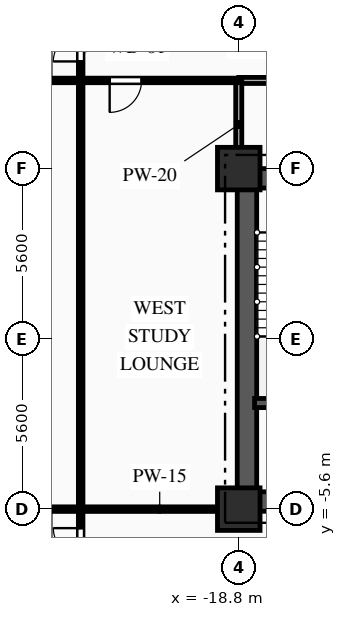
"""IFC4 building model, lengths in metres.
Left out: names, types, materials, properties, quantities, classifications, styles, units other than length and angle.
Written with IfcOpenShell. Run it as: python <this file> out.ifc"""

import sys

from ifc_helpers import new_model, si_unit, direction, frame, frame_2d, origin, origin_2d, place, context, subcontext, project, spatial, rectangle, extrude, element, fill, save


model = new_model("IFC4")
c1 = context("Model", 3, precision=1e-05, world=origin(), true_north=direction((0.0, 1.0)))
c2 = subcontext(c1, "Body", "Model", "MODEL_VIEW")
j1 = project(units=[si_unit("LENGTHUNIT", "METRE"), si_unit("PLANEANGLEUNIT", "RADIAN")], contexts=[c1])
p1 = place(None, origin())
s1 = spatial("IfcSite", under=j1, at=p1, CompositionType="ELEMENT")
p2 = place(p1, origin())
s2 = spatial("IfcBuilding", under=s1, at=p2, CompositionType="ELEMENT")
p3 = place(p2, frame((0.0, 0.0, 22.5)))
s3 = spatial("IfcBuildingStorey", under=s2, at=p3, CompositionType="ELEMENT", Elevation=22.5)
for number, where, z_axis, x_axis in (
    (1, (-18.8, -5.6, 0.0), (0.0, 0.0, 1.0), (1.0, 0.0, 0.0)),
    (2, (-18.8, 5.6, 0.0), (0.0, 0.0, 1.0), (1.0, 0.0, 0.0)),
):
    element("IfcColumn", number, at=place(p3, frame(where, z_axis=z_axis, x_axis=x_axis)), inside=s3, PredefinedType="COLUMN", context=c2, shape_type="SweptSolid", body=[
        extrude(rectangle(XDim=1.4, YDim=1.4, at=origin_2d()), origin(), (0.0, 0.0, 1.0), 4.5),
    ])
p4 = place(p3, frame((-18.8, 5.28, 0.0), z_axis=(0.0, 0.0, 1.0), x_axis=(1.0, 0.0, 0.0)))
e3 = element("IfcWall", 3, at=p4, inside=s3, PredefinedType="SHEAR", context=c2, shape_type="SweptSolid", body=[
    extrude(rectangle(XDim=9.6, YDim=0.64, at=frame_2d((4.8, 0.0))), origin(), (0.0, 0.0, 1.0), 4.16),
])
p5 = place(p4, frame((1.55, 0.0, 0.0)))
e4 = element("IfcOpeningElement", 4, at=p5, cuts=e3, PredefinedType="OPENING", context=c2, shape_type="SweptSolid", body=[
    extrude(rectangle(XDim=1.1, YDim=2.15, at=frame_2d((0.55, 1.075))), frame((0.0, 0.33, 0.0), z_axis=(0.0, -1.0, 0.0), x_axis=(1.0, 0.0, 0.0)), (0.0, 0.0, 1.0), 0.66),
])
p6 = place(p4, frame((4.775, 0.0, 0.0)))
e5 = element("IfcOpeningElement", 5, at=p6, cuts=e3, PredefinedType="OPENING", context=c2, shape_type="SweptSolid", body=[
    extrude(rectangle(XDim=1.05, YDim=2.1, at=frame_2d((0.525, 1.05))), frame((0.0, 0.33, 0.0), z_axis=(0.0, -1.0, 0.0), x_axis=(1.0, 0.0, 0.0)), (0.0, 0.0, 1.0), 0.66),
])
p7 = place(p3, frame((-18.8, -5.35, 0.0), z_axis=(0.0, 0.0, 1.0), x_axis=(1.0, 0.0, 0.0)))
e6 = element("IfcWall", 6, at=p7, inside=s3, PredefinedType="SHEAR", context=c2, shape_type="SweptSolid", body=[
    extrude(rectangle(XDim=9.6, YDim=0.64, at=frame_2d((4.8, 0.0))), origin(), (0.0, 0.0, 1.0), 4.16),
])
p8 = place(p7, frame((1.05, 0.0, 0.0)))
e7 = element("IfcOpeningElement", 7, at=p8, cuts=e6, PredefinedType="OPENING", context=c2, shape_type="SweptSolid", body=[
    extrude(rectangle(XDim=0.9, YDim=2.1, at=frame_2d((0.45, 1.05))), frame((0.0, 0.33, 0.0), z_axis=(0.0, -1.0, 0.0), x_axis=(1.0, 0.0, 0.0)), (0.0, 0.0, 1.0), 0.66),
])
p9 = place(p3, frame((-18.53, -5.05, 0.0), z_axis=(0.0, 0.0, 1.0), x_axis=(0.0, 1.0, 0.0)))
e8 = element("IfcWall", 8, at=p9, inside=s3, PredefinedType="SHEAR", context=c2, shape_type="SweptSolid", body=[
    extrude(rectangle(XDim=10.1, YDim=0.64, at=frame_2d((5.05, 0.0))), origin(), (0.0, 0.0, 1.0), 4.16),
])
p10 = place(p3, frame((-18.28, -2.11, 0.0), z_axis=(0.0, 0.0, 1.0), x_axis=(1.0, 0.0, 0.0)))
e9 = element("IfcWall", 9, at=p10, inside=s3, PredefinedType="SHEAR", context=c2, shape_type="SweptSolid", body=[
    extrude(rectangle(XDim=3.18, YDim=0.3, at=frame_2d((1.59, 0.0))), origin(), (0.0, 0.0, 1.0), 4.16),
])
p11 = place(p3, frame((-12.0, 8.5, 0.0), z_axis=(0.0, 0.0, 1.0), x_axis=(-1.0, 0.0, 0.0)))
e10 = element("IfcWall", 10, at=p11, inside=s3, PredefinedType="PARTITIONING", context=c2, shape_type="SweptSolid", body=[
    extrude(rectangle(XDim=6.8, YDim=0.2, at=frame_2d((3.4, 0.0))), origin(), (0.0, 0.0, 1.0), 4.16),
])
p12 = place(p11, frame((1.715, 0.0, 0.0)))
e11 = element("IfcOpeningElement", 11, at=p12, cuts=e10, PredefinedType="OPENING", context=c2, shape_type="SweptSolid", body=[
    extrude(rectangle(XDim=1.1, YDim=2.15, at=frame_2d((0.55, 1.075))), frame((0.0, 0.11, 0.0), z_axis=(0.0, -1.0, 0.0), x_axis=(1.0, 0.0, 0.0)), (0.0, 0.0, 1.0), 0.22),
])
p13 = place(p3, frame((-18.8, 8.5, 0.0), z_axis=(0.0, 0.0, 1.0), x_axis=(0.0, -1.0, 0.0)))
e12 = element("IfcWall", 12, at=p13, inside=s3, PredefinedType="PARTITIONING", context=c2, shape_type="SweptSolid", body=[
    extrude(rectangle(XDim=2.9, YDim=0.2, at=frame_2d((1.45, 0.0))), origin(), (0.0, 0.0, 1.0), 3.645),
])
p14 = place(p3, frame((-24.0, 8.5, 0.0), z_axis=(0.0, 0.0, 1.0), x_axis=(0.0, 1.0, 0.0)))
e13 = element("IfcWall", 13, at=p14, inside=s3, PredefinedType="PARTITIONING", context=c2, shape_type="SweptSolid", body=[
    extrude(rectangle(XDim=2.15, YDim=0.15, at=frame_2d((1.075, 0.0))), origin(), (0.0, 0.0, 1.0), 4.16),
])
p15 = place(p14, frame((0.625, 0.0, 0.0)))
e14 = element("IfcOpeningElement", 14, at=p15, cuts=e13, PredefinedType="OPENING", context=c2, shape_type="SweptSolid", body=[
    extrude(rectangle(XDim=0.9, YDim=2.1, at=frame_2d((0.45, 1.05))), frame((0.0, 0.085, 0.0), z_axis=(0.0, -1.0, 0.0), x_axis=(1.0, 0.0, 0.0)), (0.0, 0.0, 1.0), 0.17),
])
p16 = place(p3, frame((-18.8, 8.5, 0.0), z_axis=(0.0, 0.0, 1.0), x_axis=(-1.0, 0.0, 0.0)))
e15 = element("IfcWall", 15, at=p16, inside=s3, PredefinedType="PARTITIONING", context=c2, shape_type="SweptSolid", body=[
    extrude(rectangle(XDim=5.2, YDim=0.15, at=frame_2d((2.6, 0.0))), origin(), (0.0, 0.0, 1.0), 4.16),
])
p17 = place(p16, frame((3.196, 0.0, 0.0)))
e16 = element("IfcOpeningElement", 16, at=p17, cuts=e15, PredefinedType="OPENING", context=c2, shape_type="SweptSolid", body=[
    extrude(rectangle(XDim=1.05, YDim=2.15, at=frame_2d((0.525, 1.075))), frame((0.0, 0.085, 0.0), z_axis=(0.0, -1.0, 0.0), x_axis=(1.0, 0.0, 0.0)), (0.0, 0.0, 1.0), 0.17),
])
p18 = place(p3, frame((-24.0, -7.75, 0.0), z_axis=(0.0, 0.0, 1.0), x_axis=(0.0, 1.0, 0.0)))
e17 = element("IfcWall", 17, at=p18, inside=s3, PredefinedType="PARTITIONING", context=c2, shape_type="SweptSolid", body=[
    extrude(rectangle(XDim=2.15, YDim=0.15, at=frame_2d((1.075, 0.0))), origin(), (0.0, 0.0, 1.0), 4.16),
])
p19 = place(p18, frame((0.625, 0.0, 0.0)))
e18 = element("IfcOpeningElement", 18, at=p19, cuts=e17, PredefinedType="OPENING", context=c2, shape_type="SweptSolid", body=[
    extrude(rectangle(XDim=0.9, YDim=2.1, at=frame_2d((0.45, 1.05))), frame((0.0, 0.085, 0.0), z_axis=(0.0, -1.0, 0.0), x_axis=(1.0, 0.0, 0.0)), (0.0, 0.0, 1.0), 0.17),
])
p20 = place(p3, frame((-24.0, -5.6, 0.0), z_axis=(0.0, 0.0, 1.0), x_axis=(1.0, 0.0, 0.0)))
e19 = element("IfcWall", 19, at=p20, inside=s3, PredefinedType="PARTITIONING", context=c2, shape_type="SweptSolid", body=[
    extrude(rectangle(XDim=5.2, YDim=0.15, at=frame_2d((2.6, 0.0))), origin(), (0.0, 0.0, 1.0), 4.16),
])
p21 = place(p3, frame((-26.65, 8.5, 0.0), z_axis=(0.0, 0.0, 1.0), x_axis=(1.0, 0.0, 0.0)))
e20 = element("IfcWall", 20, at=p21, inside=s3, PredefinedType="PARTITIONING", context=c2, shape_type="SweptSolid", body=[
    extrude(rectangle(XDim=2.65, YDim=0.15, at=frame_2d((1.325, 0.0))), origin(), (0.0, 0.0, 1.0), 4.16),
])
p22 = place(p21, frame((0.635, 0.0, 0.0)))
e21 = element("IfcOpeningElement", 21, at=p22, cuts=e20, PredefinedType="OPENING", context=c2, shape_type="SweptSolid", body=[
    extrude(rectangle(XDim=1.05, YDim=2.15, at=frame_2d((0.525, 1.075))), frame((0.0, 0.085, 0.0), z_axis=(0.0, -1.0, 0.0), x_axis=(1.0, 0.0, 0.0)), (0.0, 0.0, 1.0), 0.17),
])
p23 = place(p3, frame((-24.0, -5.6, 0.0), z_axis=(0.0, 0.0, 1.0), x_axis=(-1.0, 0.0, 0.0)))
e22 = element("IfcWall", 22, at=p23, inside=s3, PredefinedType="PARTITIONING", context=c2, shape_type="SweptSolid", body=[
    extrude(rectangle(XDim=2.65, YDim=0.15, at=frame_2d((1.325, 0.0))), origin(), (0.0, 0.0, 1.0), 4.16),
])
p24 = place(p23, frame((0.965, 0.0, 0.0)))
e23 = element("IfcOpeningElement", 23, at=p24, cuts=e22, PredefinedType="OPENING", context=c2, shape_type="SweptSolid", body=[
    extrude(rectangle(XDim=1.05, YDim=2.15, at=frame_2d((0.525, 1.075))), frame((0.0, 0.085, 0.0), z_axis=(0.0, -1.0, 0.0), x_axis=(1.0, 0.0, 0.0)), (0.0, 0.0, 1.0), 0.17),
])
p25 = place(p3, frame((-24.0, 8.5, 0.0), z_axis=(0.0, 0.0, 1.0), x_axis=(0.0, -1.0, 0.0)))
e24 = element("IfcWall", 24, at=p25, inside=s3, PredefinedType="PARTITIONING", context=c2, shape_type="SweptSolid", body=[
    extrude(rectangle(XDim=14.1, YDim=0.15, at=frame_2d((7.05, 0.0))), origin(), (0.0, 0.0, 1.0), 4.16),
])
p26 = place(p15, origin())
e25 = element("IfcDoor", 25, at=p26, inside=s3, OperationType="SINGLE_SWING_LEFT", PredefinedType="DOOR", context=c2, shape_type="SweptSolid", body=[
    extrude(rectangle(XDim=0.9, YDim=2.1, at=frame_2d((0.45, 1.05))), frame((0.0, 0.025, 0.0), z_axis=(0.0, -1.0, 0.0), x_axis=(1.0, 0.0, 0.0)), (0.0, 0.0, 1.0), 0.05),
])
fill(e14, e25)
p27 = place(p17, origin())
e26 = element("IfcDoor", 26, at=p27, inside=s3, OperationType="SINGLE_SWING_RIGHT", PredefinedType="DOOR", context=c2, shape_type="SweptSolid", body=[
    extrude(rectangle(XDim=1.05, YDim=2.15, at=frame_2d((0.525, 1.075))), frame((0.0, 0.025, 0.0), z_axis=(0.0, -1.0, 0.0), x_axis=(1.0, 0.0, 0.0)), (0.0, 0.0, 1.0), 0.05),
])
fill(e16, e26)
p28 = place(p19, origin())
e27 = element("IfcDoor", 27, at=p28, inside=s3, OperationType="SINGLE_SWING_RIGHT", PredefinedType="DOOR", context=c2, shape_type="SweptSolid", body=[
    extrude(rectangle(XDim=0.9, YDim=2.1, at=frame_2d((0.45, 1.05))), frame((0.0, 0.025, 0.0), z_axis=(0.0, -1.0, 0.0), x_axis=(1.0, 0.0, 0.0)), (0.0, 0.0, 1.0), 0.05),
])
fill(e18, e27)
save(model, sys.argv[1])
